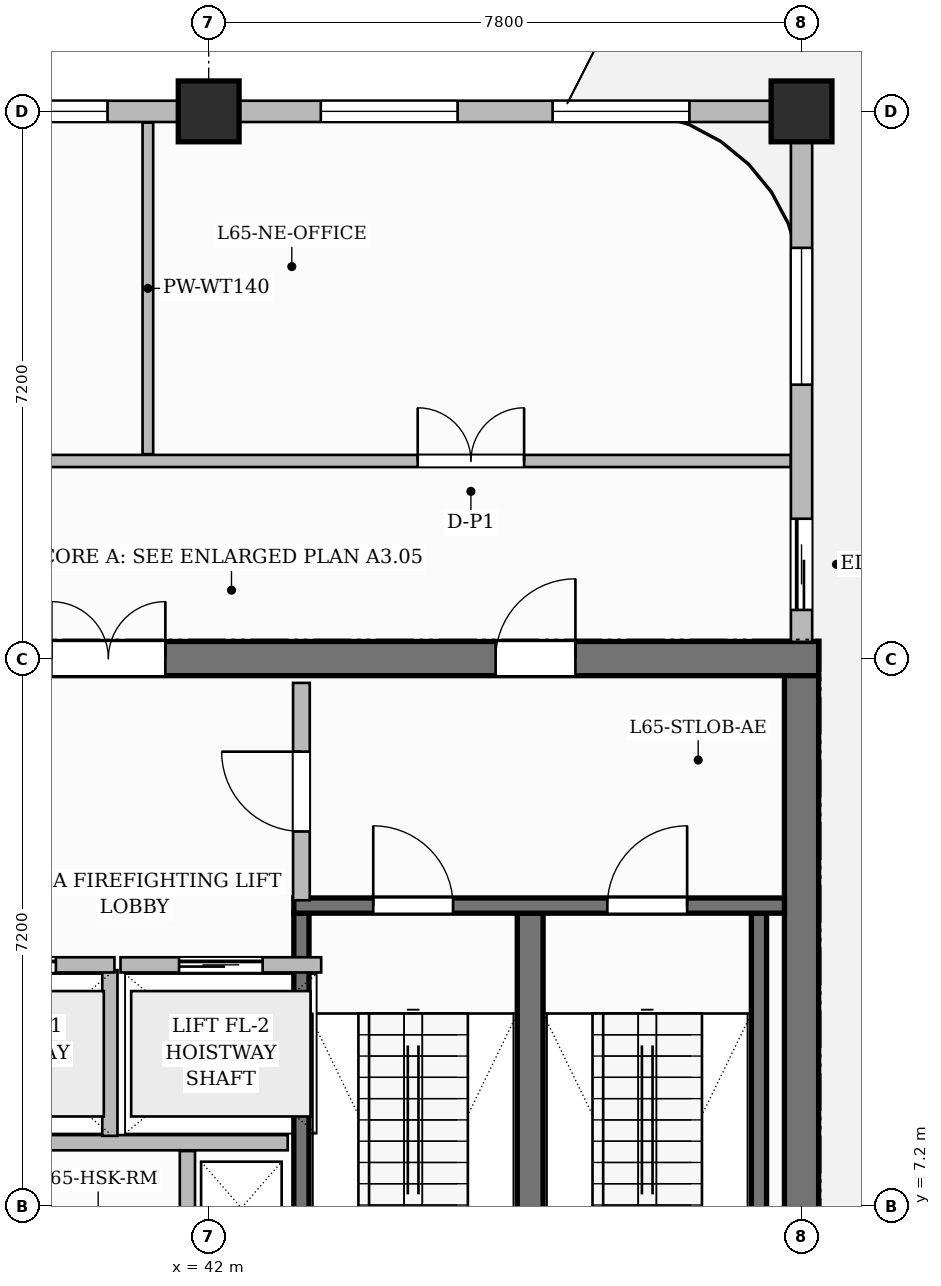
"""IFC4 building model, lengths in metres.
Left out: names, types, materials, properties, quantities, classifications, styles, units other than length and angle.
Written with IfcOpenShell. Run it as: python <this file> out.ifc"""

import sys

from ifc_helpers import new_model, si_unit, direction, frame, frame_2d, origin, origin_2d, place, context, subcontext, project, spatial, rectangle, extrude, source, transform, mapped, element, fill, save


model = new_model("IFC4")
c1 = context("Model", 3, precision=1e-05, world=origin(), true_north=direction((0.0, 1.0)))
c2 = subcontext(c1, "Body", "Model", "MODEL_VIEW")
j1 = project(units=[si_unit("LENGTHUNIT", "METRE"), si_unit("PLANEANGLEUNIT", "RADIAN")], contexts=[c1])
p1 = place(None, origin())
s1 = spatial("IfcSite", under=j1, at=p1, CompositionType="ELEMENT")
p2 = place(p1, origin())
s2 = spatial("IfcBuilding", under=s1, at=p2, CompositionType="ELEMENT")
p3 = place(p2, frame((0.0, 0.0, 259.65)))
s3 = spatial("IfcBuildingStorey", under=s2, at=p3, CompositionType="ELEMENT", Elevation=259.65)
p4 = place(p3, frame((34.575, 14.4, 0.0), z_axis=(0.0, 0.0, 1.0), x_axis=(1.0, 0.0, 0.0)))
e1 = element("IfcWall", 1, at=p4, inside=s3, PredefinedType="SHEAR", context=c2, shape_type="SweptSolid", body=[
    extrude(rectangle(XDim=15.45, YDim=0.45, at=frame_2d((7.725, 0.0))), origin(), (0.0, 0.0, 1.0), 3.85),
])
p5 = place(p4, frame((5.355, 0.0, 0.0)))
e2 = element("IfcOpeningElement", 2, at=p5, cuts=e1, PredefinedType="OPENING", context=c2, shape_type="SweptSolid", body=[
    extrude(rectangle(XDim=1.5, YDim=2.2, at=frame_2d((0.75, 1.1))), frame((0.0, 0.235, 0.0), z_axis=(0.0, -1.0, 0.0), x_axis=(1.0, 0.0, 0.0)), (0.0, 0.0, 1.0), 0.47),
])
p6 = place(p4, frame((1.57, 0.0, 0.0)))
e3 = element("IfcOpeningElement", 3, at=p6, cuts=e1, PredefinedType="OPENING", context=c2, shape_type="SweptSolid", body=[
    extrude(rectangle(XDim=1.05, YDim=2.15, at=frame_2d((0.525, 1.075))), frame((0.0, 0.235, 0.0), z_axis=(0.0, -1.0, 0.0), x_axis=(1.0, 0.0, 0.0)), (0.0, 0.0, 1.0), 0.47),
])
p7 = place(p4, frame((11.2, 0.0, 0.0)))
e4 = element("IfcOpeningElement", 4, at=p7, cuts=e1, PredefinedType="OPENING", context=c2, shape_type="SweptSolid", body=[
    extrude(rectangle(XDim=1.05, YDim=2.15, at=frame_2d((0.525, 1.075))), frame((0.0, 0.235, 0.0), z_axis=(0.0, -1.0, 0.0), x_axis=(1.0, 0.0, 0.0)), (0.0, 0.0, 1.0), 0.47),
])
p8 = place(p3, frame((49.8, 3.825, 0.0), z_axis=(0.0, 0.0, 1.0), x_axis=(0.0, 1.0, 0.0)))
e5 = element("IfcWall", 5, at=p8, inside=s3, PredefinedType="SHEAR", context=c2, shape_type="SweptSolid", body=[
    extrude(rectangle(XDim=10.35, YDim=0.45, at=frame_2d((5.175, 0.0))), origin(), (0.0, 0.0, 1.0), 3.85),
])
m1 = source(origin(), c2, "Body", "SweptSolid", [
    extrude(rectangle(XDim=0.8, YDim=0.8, at=origin_2d()), origin(), (0.0, 0.0, 1.0), 3.85),
])
for number, where, z_axis, x_axis in (
    (6, (42.0, 21.6, 0.0), (0.0, 0.0, 1.0), (1.0, 0.0, 0.0)),
    (7, (49.8, 21.6, 0.0), (0.0, 0.0, 1.0), (1.0, 0.0, 0.0)),
):
    element("IfcColumn", number, at=place(p3, frame(where, z_axis=z_axis, x_axis=x_axis)), inside=s3, PredefinedType="COLUMN", context=c2, shape_type="MappedRepresentation", body=[
        mapped(m1, transform((0.0, 0.0, 0.0), scale=1.0)),
    ])
p9 = place(p3, frame((43.22, 4.1, 0.0), z_axis=(0.0, 0.0, 1.0), x_axis=(0.0, 1.0, 0.0)))
e8 = element("IfcWall", 8, at=p9, inside=s3, PredefinedType="SHEAR", context=c2, shape_type="SweptSolid", body=[
    extrude(rectangle(XDim=6.95, YDim=0.2, at=frame_2d((3.475, 0.0))), origin(), (0.0, 0.0, 1.0), 3.85),
])
p10 = place(p3, frame((46.23, 4.1, 0.0), z_axis=(0.0, 0.0, 1.0), x_axis=(0.0, 1.0, 0.0)))
e9 = element("IfcWall", 9, at=p10, inside=s3, PredefinedType="SHEAR", context=c2, shape_type="SweptSolid", body=[
    extrude(rectangle(XDim=6.95, YDim=0.34, at=frame_2d((3.475, 0.0))), origin(), (0.0, 0.0, 1.0), 3.85),
])
p11 = place(p3, frame((49.24, 4.1, 0.0), z_axis=(0.0, 0.0, 1.0), x_axis=(0.0, 1.0, 0.0)))
e10 = element("IfcWall", 10, at=p11, inside=s3, PredefinedType="SHEAR", context=c2, shape_type="SweptSolid", body=[
    extrude(rectangle(XDim=6.95, YDim=0.2, at=frame_2d((3.475, 0.0))), origin(), (0.0, 0.0, 1.0), 3.85),
])
p12 = place(p3, frame((43.12, 11.15, 0.0), z_axis=(0.0, 0.0, 1.0), x_axis=(1.0, 0.0, 0.0)))
e11 = element("IfcWall", 11, at=p12, inside=s3, PredefinedType="SHEAR", context=c2, shape_type="SweptSolid", body=[
    extrude(rectangle(XDim=6.455, YDim=0.2, at=frame_2d((3.228, 0.0))), origin(), (0.0, 0.0, 1.0), 3.85),
])
p13 = place(p12, frame((1.045, 0.0, 0.0)))
e12 = element("IfcOpeningElement", 12, at=p13, cuts=e11, PredefinedType="OPENING", context=c2, shape_type="SweptSolid", body=[
    extrude(rectangle(XDim=1.05, YDim=2.2, at=frame_2d((0.525, 1.1))), frame((0.0, 0.11, 0.0), z_axis=(0.0, -1.0, 0.0), x_axis=(1.0, 0.0, 0.0)), (0.0, 0.0, 1.0), 0.22),
])
p14 = place(p12, frame((4.125, 0.0, 0.0)))
e13 = element("IfcOpeningElement", 13, at=p14, cuts=e11, PredefinedType="OPENING", context=c2, shape_type="SweptSolid", body=[
    extrude(rectangle(XDim=1.05, YDim=2.2, at=frame_2d((0.525, 1.1))), frame((0.0, 0.11, 0.0), z_axis=(0.0, -1.0, 0.0), x_axis=(1.0, 0.0, 0.0)), (0.0, 0.0, 1.0), 0.22),
])
p15 = place(p3, frame((38.3, 8.03, 0.0), z_axis=(0.0, 0.0, 1.0), x_axis=(1.0, 0.0, 0.0)))
e14 = element("IfcWall", 14, at=p15, inside=s3, PredefinedType="PARTITIONING", context=c2, shape_type="SweptSolid", body=[
    extrude(rectangle(XDim=4.74, YDim=0.2, at=frame_2d((2.37, 0.0))), origin(), (0.0, 0.0, 1.0), 3.6),
])
p16 = place(p3, frame((40.7, 8.12, 0.0), z_axis=(0.0, 0.0, 1.0), x_axis=(0.0, 1.0, 0.0)))
e15 = element("IfcWall", 15, at=p16, inside=s3, PredefinedType="PARTITIONING", context=c2, shape_type="SweptSolid", body=[
    extrude(rectangle(XDim=2.18, YDim=0.2, at=frame_2d((1.09, 0.0))), origin(), (0.0, 0.0, 1.0), 3.6),
])
p17 = place(p3, frame((43.22, 11.22, 0.0), z_axis=(0.0, 0.0, 1.0), x_axis=(0.0, 1.0, 0.0)))
e16 = element("IfcWall", 16, at=p17, inside=s3, PredefinedType="PARTITIONING", context=c2, shape_type="SweptSolid", body=[
    extrude(rectangle(XDim=2.86, YDim=0.22, at=frame_2d((1.43, 0.0))), origin(), (0.0, 0.0, 1.0), 3.6),
])
p18 = place(p17, frame((0.905, 0.0, 0.0)))
e17 = element("IfcOpeningElement", 17, at=p18, cuts=e16, PredefinedType="OPENING", context=c2, shape_type="SweptSolid", body=[
    extrude(rectangle(XDim=1.05, YDim=2.15, at=frame_2d((0.525, 1.075))), frame((0.0, 0.12, 0.0), z_axis=(0.0, -1.0, 0.0), x_axis=(1.0, 0.0, 0.0)), (0.0, 0.0, 1.0), 0.24),
])
p19 = place(p3, frame((41.72, 6.13, 0.0), z_axis=(0.0, 0.0, 1.0), x_axis=(0.0, 1.0, 0.0)))
e18 = element("IfcWall", 18, at=p19, inside=s3, PredefinedType="PARTITIONING", context=c2, shape_type="SweptSolid", body=[
    extrude(rectangle(XDim=1.79, YDim=0.2, at=frame_2d((0.895, 0.0))), origin(), (0.0, 0.0, 1.0), 3.6),
])
p20 = place(p3, frame((30.29, 17.0, 0.0), z_axis=(0.0, 0.0, 1.0), x_axis=(1.0, 0.0, 0.0)))
e19 = element("IfcWall", 19, at=p20, inside=s3, PredefinedType="PARTITIONING", context=c2, shape_type="SweptSolid", body=[
    extrude(rectangle(XDim=19.37, YDim=0.16, at=frame_2d((9.685, 0.0))), origin(), (0.0, 0.0, 1.0), 3.6),
])
p21 = place(p20, frame((1.185, 0.0, 0.0)))
e20 = element("IfcOpeningElement", 20, at=p21, cuts=e19, PredefinedType="OPENING", context=c2, shape_type="SweptSolid", body=[
    extrude(rectangle(XDim=0.85, YDim=2.1, at=frame_2d((0.425, 1.05))), frame((0.0, 0.09, 0.0), z_axis=(0.0, -1.0, 0.0), x_axis=(1.0, 0.0, 0.0)), (0.0, 0.0, 1.0), 0.18),
])
p22 = place(p20, frame((6.66, 0.0, 0.0)))
e21 = element("IfcOpeningElement", 21, at=p22, cuts=e19, PredefinedType="OPENING", context=c2, shape_type="SweptSolid", body=[
    extrude(rectangle(XDim=0.9, YDim=2.15, at=frame_2d((0.45, 1.075))), frame((0.0, 0.09, 0.0), z_axis=(0.0, -1.0, 0.0), x_axis=(1.0, 0.0, 0.0)), (0.0, 0.0, 1.0), 0.18),
])
p23 = place(p20, frame((14.46, 0.0, 0.0)))
e22 = element("IfcOpeningElement", 22, at=p23, cuts=e19, PredefinedType="OPENING", context=c2, shape_type="SweptSolid", body=[
    extrude(rectangle(XDim=1.4, YDim=2.35, at=frame_2d((0.7, 1.175))), frame((0.0, 0.09, 0.0), z_axis=(0.0, -1.0, 0.0), x_axis=(1.0, 0.0, 0.0)), (0.0, 0.0, 1.0), 0.18),
])
p24 = place(p3, frame((41.2, 17.09, 0.0), z_axis=(0.0, 0.0, 1.0), x_axis=(0.0, 1.0, 0.0)))
e23 = element("IfcWall", 23, at=p24, inside=s3, PredefinedType="PARTITIONING", context=c2, shape_type="SweptSolid", body=[
    extrude(rectangle(XDim=4.362, YDim=0.14, at=frame_2d((2.181, 0.0))), origin(), (0.0, 0.0, 1.0), 3.6),
])
p25 = place(p3, frame((38.12, 10.37, 0.0), z_axis=(0.0, 0.0, 1.0), x_axis=(1.0, 0.0, 0.0)))
e24 = element("IfcWall", 24, at=p25, inside=s3, PredefinedType="PARTITIONING", context=c2, shape_type="SweptSolid", body=[
    extrude(rectangle(XDim=2.64, YDim=0.2, at=frame_2d((1.32, 0.0))), origin(), (0.0, 0.0, 1.0), 3.6),
])
p26 = place(p25, frame((0.77, 0.0, 0.0)))
e25 = element("IfcOpeningElement", 25, at=p26, cuts=e24, PredefinedType="OPENING", context=c2, shape_type="SweptSolid", body=[
    extrude(rectangle(XDim=1.1, YDim=2.2, at=frame_2d((0.55, 1.1))), frame((0.0, 0.11, 0.0), z_axis=(0.0, -1.0, 0.0), x_axis=(1.0, 0.0, 0.0)), (0.0, 0.0, 1.0), 0.22),
])
p27 = place(p3, frame((40.84, 10.37, 0.0), z_axis=(0.0, 0.0, 1.0), x_axis=(1.0, 0.0, 0.0)))
e26 = element("IfcWall", 26, at=p27, inside=s3, PredefinedType="PARTITIONING", context=c2, shape_type="SweptSolid", body=[
    extrude(rectangle(XDim=2.64, YDim=0.2, at=frame_2d((1.32, 0.0))), origin(), (0.0, 0.0, 1.0), 3.6),
])
p28 = place(p27, frame((0.77, 0.0, 0.0)))
e27 = element("IfcOpeningElement", 27, at=p28, cuts=e26, PredefinedType="OPENING", context=c2, shape_type="SweptSolid", body=[
    extrude(rectangle(XDim=1.1, YDim=2.2, at=frame_2d((0.55, 1.1))), frame((0.0, 0.11, 0.0), z_axis=(0.0, -1.0, 0.0), x_axis=(1.0, 0.0, 0.0)), (0.0, 0.0, 1.0), 0.22),
])
p29 = place(p3, frame((49.8, 14.62, 0.0), z_axis=(0.0, 0.0, 1.0), x_axis=(0.0, 1.0, 0.0)))
e28 = element("IfcWall", 28, at=p29, inside=s3, PredefinedType="SOLIDWALL", context=c2, shape_type="SweptSolid", body=[
    extrude(rectangle(XDim=6.93, YDim=0.28, at=frame_2d((3.465, 0.0))), origin(), (0.0, 0.0, 1.0), 3.185),
])
p30 = place(p29, frame((0.42, 0.0, 0.0)))
e29 = element("IfcOpeningElement", 29, at=p30, cuts=e28, PredefinedType="OPENING", context=c2, shape_type="SweptSolid", body=[
    extrude(rectangle(XDim=1.2, YDim=2.2, at=frame_2d((0.6, 1.1))), frame((0.0, 0.15, 0.0), z_axis=(0.0, -1.0, 0.0), x_axis=(1.0, 0.0, 0.0)), (0.0, 0.0, 1.0), 0.3),
])
p31 = place(p29, frame((3.384, 0.0, 0.8)))
e30 = element("IfcOpeningElement", 30, at=p31, cuts=e28, PredefinedType="OPENING", context=c2, shape_type="SweptSolid", body=[
    extrude(rectangle(XDim=1.8, YDim=1.85, at=frame_2d((0.9, 0.925))), frame((0.0, 0.15, 0.0), z_axis=(0.0, -1.0, 0.0), x_axis=(1.0, 0.0, 0.0)), (0.0, 0.0, 1.0), 0.3),
])
p32 = place(p3, frame((18.0, 21.6, 0.0), z_axis=(0.0, 0.0, 1.0), x_axis=(1.0, 0.0, 0.0)))
e31 = element("IfcWall", 31, at=p32, inside=s3, PredefinedType="SOLIDWALL", context=c2, shape_type="SweptSolid", body=[
    extrude(rectangle(XDim=31.8, YDim=0.28, at=frame_2d((15.9, 0.0))), origin(), (0.0, 0.0, 1.0), 3.185),
])
p33 = place(p32, frame((0.42, 0.0, 0.0)))
e32 = element("IfcOpeningElement", 32, at=p33, cuts=e31, PredefinedType="OPENING", context=c2, shape_type="SweptSolid", body=[
    extrude(rectangle(XDim=1.2, YDim=2.2, at=frame_2d((0.6, 1.1))), frame((0.0, 0.15, 0.0), z_axis=(0.0, -1.0, 0.0), x_axis=(1.0, 0.0, 0.0)), (0.0, 0.0, 1.0), 0.3),
])
p34 = place(p32, frame((4.721, 0.0, 0.8)))
e33 = element("IfcOpeningElement", 33, at=p34, cuts=e31, PredefinedType="OPENING", context=c2, shape_type="SweptSolid", body=[
    extrude(rectangle(XDim=1.15, YDim=1.8, at=frame_2d((0.575, 0.9))), frame((0.0, 0.15, 0.0), z_axis=(0.0, -1.0, 0.0), x_axis=(1.0, 0.0, 0.0)), (0.0, 0.0, 1.0), 0.3),
])
p35 = place(p32, frame((7.204, 0.0, 0.8)))
e34 = element("IfcOpeningElement", 34, at=p35, cuts=e31, PredefinedType="OPENING", context=c2, shape_type="SweptSolid", body=[
    extrude(rectangle(XDim=1.8, YDim=1.85, at=frame_2d((0.9, 0.925))), frame((0.0, 0.15, 0.0), z_axis=(0.0, -1.0, 0.0), x_axis=(1.0, 0.0, 0.0)), (0.0, 0.0, 1.0), 0.3),
])
p36 = place(p32, frame((13.001, 0.0, 0.8)))
e35 = element("IfcOpeningElement", 35, at=p36, cuts=e31, PredefinedType="OPENING", context=c2, shape_type="SweptSolid", body=[
    extrude(rectangle(XDim=1.8, YDim=1.85, at=frame_2d((0.9, 0.925))), frame((0.0, 0.15, 0.0), z_axis=(0.0, -1.0, 0.0), x_axis=(1.0, 0.0, 0.0)), (0.0, 0.0, 1.0), 0.3),
])
p37 = place(p32, frame((18.123, 0.0, 0.8)))
e36 = element("IfcOpeningElement", 36, at=p37, cuts=e31, PredefinedType="OPENING", context=c2, shape_type="SweptSolid", body=[
    extrude(rectangle(XDim=1.8, YDim=1.85, at=frame_2d((0.9, 0.925))), frame((0.0, 0.15, 0.0), z_axis=(0.0, -1.0, 0.0), x_axis=(1.0, 0.0, 0.0)), (0.0, 0.0, 1.0), 0.3),
])
p38 = place(p32, frame((20.869, 0.0, 0.8)))
e37 = element("IfcOpeningElement", 37, at=p38, cuts=e31, PredefinedType="OPENING", context=c2, shape_type="SweptSolid", body=[
    extrude(rectangle(XDim=1.8, YDim=1.85, at=frame_2d((0.9, 0.925))), frame((0.0, 0.15, 0.0), z_axis=(0.0, -1.0, 0.0), x_axis=(1.0, 0.0, 0.0)), (0.0, 0.0, 1.0), 0.3),
])
p39 = place(p32, frame((25.475, 0.0, 0.8)))
e38 = element("IfcOpeningElement", 38, at=p39, cuts=e31, PredefinedType="OPENING", context=c2, shape_type="SweptSolid", body=[
    extrude(rectangle(XDim=1.8, YDim=1.85, at=frame_2d((0.9, 0.925))), frame((0.0, 0.15, 0.0), z_axis=(0.0, -1.0, 0.0), x_axis=(1.0, 0.0, 0.0)), (0.0, 0.0, 1.0), 0.3),
])
p40 = place(p32, frame((28.525, 0.0, 0.8)))
e39 = element("IfcOpeningElement", 39, at=p40, cuts=e31, PredefinedType="OPENING", context=c2, shape_type="SweptSolid", body=[
    extrude(rectangle(XDim=1.8, YDim=1.85, at=frame_2d((0.9, 0.925))), frame((0.0, 0.15, 0.0), z_axis=(0.0, -1.0, 0.0), x_axis=(1.0, 0.0, 0.0)), (0.0, 0.0, 1.0), 0.3),
])
m2 = source(origin(), c2, "Body", "SweptSolid", [
    extrude(rectangle(XDim=1.05, YDim=2.2, at=frame_2d((0.525, 1.1))), frame((0.0, 0.025, 0.0), z_axis=(0.0, -1.0, 0.0), x_axis=(1.0, 0.0, 0.0)), (0.0, 0.0, 1.0), 0.05),
])
p41 = place(p13, origin())
e40 = element("IfcDoor", 40, at=p41, inside=s3, OperationType="SINGLE_SWING_LEFT", PredefinedType="DOOR", context=c2, shape_type="MappedRepresentation", body=[
    mapped(m2, transform((0.0, 0.0, 0.0), scale=1.0)),
])
fill(e12, e40)
p42 = place(p14, origin())
e41 = element("IfcDoor", 41, at=p42, inside=s3, OperationType="SINGLE_SWING_RIGHT", PredefinedType="DOOR", context=c2, shape_type="MappedRepresentation", body=[
    mapped(m2, transform((0.0, 0.0, 0.0), scale=1.0)),
])
fill(e13, e41)
m3 = source(origin(), c2, "Body", "SweptSolid", [
    extrude(rectangle(XDim=1.05, YDim=2.15, at=frame_2d((0.525, 1.075))), frame((0.0, 0.025, 0.0), z_axis=(0.0, -1.0, 0.0), x_axis=(1.0, 0.0, 0.0)), (0.0, 0.0, 1.0), 0.05),
])
p43 = place(p18, origin())
e42 = element("IfcDoor", 42, at=p43, inside=s3, OperationType="SINGLE_SWING_RIGHT", PredefinedType="DOOR", context=c2, shape_type="MappedRepresentation", body=[
    mapped(m3, transform((0.0, 0.0, 0.0), scale=1.0)),
])
fill(e17, e42)
m4 = source(origin(), c2, "Body", "SweptSolid", [
    extrude(rectangle(XDim=1.5, YDim=2.2, at=frame_2d((0.75, 1.1))), frame((0.0, 0.025, 0.0), z_axis=(0.0, -1.0, 0.0), x_axis=(1.0, 0.0, 0.0)), (0.0, 0.0, 1.0), 0.05),
])
p44 = place(p5, origin())
e43 = element("IfcDoor", 43, at=p44, inside=s3, OperationType="DOUBLE_DOOR_SINGLE_SWING", PredefinedType="DOOR", context=c2, shape_type="MappedRepresentation", body=[
    mapped(m4, transform((0.0, 0.0, 0.0), scale=1.0)),
])
fill(e2, e43)
p45 = place(p7, origin())
e44 = element("IfcDoor", 44, at=p45, inside=s3, OperationType="SINGLE_SWING_RIGHT", PredefinedType="DOOR", context=c2, shape_type="MappedRepresentation", body=[
    mapped(m3, transform((0.0, 0.0, 0.0), scale=1.0)),
])
fill(e4, e44)
m5 = source(origin(), c2, "Body", "SweptSolid", [
    extrude(rectangle(XDim=1.4, YDim=2.35, at=frame_2d((0.7, 1.175))), frame((0.0, 0.025, 0.0), z_axis=(0.0, -1.0, 0.0), x_axis=(1.0, 0.0, 0.0)), (0.0, 0.0, 1.0), 0.05),
])
p46 = place(p23, origin())
e45 = element("IfcDoor", 45, at=p46, inside=s3, OperationType="DOUBLE_DOOR_SINGLE_SWING", PredefinedType="DOOR", context=c2, shape_type="MappedRepresentation", body=[
    mapped(m5, transform((0.0, 0.0, 0.0), scale=1.0)),
])
fill(e22, e45)
m6 = source(origin(), c2, "Body", "SweptSolid", [
    extrude(rectangle(XDim=1.1, YDim=2.2, at=frame_2d((0.55, 1.1))), frame((0.0, 0.025, 0.0), z_axis=(0.0, -1.0, 0.0), x_axis=(1.0, 0.0, 0.0)), (0.0, 0.0, 1.0), 0.05),
])
p47 = place(p26, origin())
e46 = element("IfcDoor", 46, at=p47, inside=s3, OperationType="SLIDING_TO_LEFT", PredefinedType="DOOR", context=c2, shape_type="MappedRepresentation", body=[
    mapped(m6, transform((0.0, 0.0, 0.0), scale=1.0)),
])
fill(e25, e46)
p48 = place(p28, origin())
e47 = element("IfcDoor", 47, at=p48, inside=s3, OperationType="SLIDING_TO_LEFT", PredefinedType="DOOR", context=c2, shape_type="MappedRepresentation", body=[
    mapped(m6, transform((0.0, 0.0, 0.0), scale=1.0)),
])
fill(e27, e47)
m7 = source(origin(), c2, "Body", "SweptSolid", [
    extrude(rectangle(XDim=1.2, YDim=2.2, at=frame_2d((0.6, 1.1))), frame((0.0, 0.025, 0.0), z_axis=(0.0, -1.0, 0.0), x_axis=(1.0, 0.0, 0.0)), (0.0, 0.0, 1.0), 0.05),
])
p49 = place(p30, origin())
e48 = element("IfcDoor", 48, at=p49, inside=s3, OperationType="SLIDING_TO_LEFT", PredefinedType="DOOR", context=c2, shape_type="MappedRepresentation", body=[
    mapped(m7, transform((0.0, 0.0, 0.0), scale=1.0)),
])
fill(e29, e48)
m8 = source(origin(), c2, "Body", "SweptSolid", [
    extrude(rectangle(XDim=1.8, YDim=1.85, at=frame_2d((0.9, 0.925))), frame((0.0, 0.03, 0.0), z_axis=(0.0, -1.0, 0.0), x_axis=(1.0, 0.0, 0.0)), (0.0, 0.0, 1.0), 0.06),
])
p50 = place(p31, origin())
e49 = element("IfcWindow", 49, at=p50, inside=s3, PartitioningType="DOUBLE_PANEL_VERTICAL", PredefinedType="WINDOW", context=c2, shape_type="MappedRepresentation", body=[
    mapped(m8, transform((0.0, 0.0, 0.0), scale=1.0)),
])
fill(e30, e49)
p51 = place(p38, origin())
e50 = element("IfcWindow", 50, at=p51, inside=s3, PartitioningType="DOUBLE_PANEL_VERTICAL", PredefinedType="WINDOW", context=c2, shape_type="MappedRepresentation", body=[
    mapped(m8, transform((0.0, 0.0, 0.0), scale=1.0)),
])
fill(e37, e50)
p52 = place(p39, origin())
e51 = element("IfcWindow", 51, at=p52, inside=s3, PartitioningType="DOUBLE_PANEL_VERTICAL", PredefinedType="WINDOW", context=c2, shape_type="MappedRepresentation", body=[
    mapped(m8, transform((0.0, 0.0, 0.0), scale=1.0)),
])
fill(e38, e51)
p53 = place(p40, origin())
e52 = element("IfcWindow", 52, at=p53, inside=s3, PartitioningType="DOUBLE_PANEL_VERTICAL", PredefinedType="WINDOW", context=c2, shape_type="MappedRepresentation", body=[
    mapped(m8, transform((0.0, 0.0, 0.0), scale=1.0)),
])
fill(e39, e52)
save(model, sys.argv[1])
